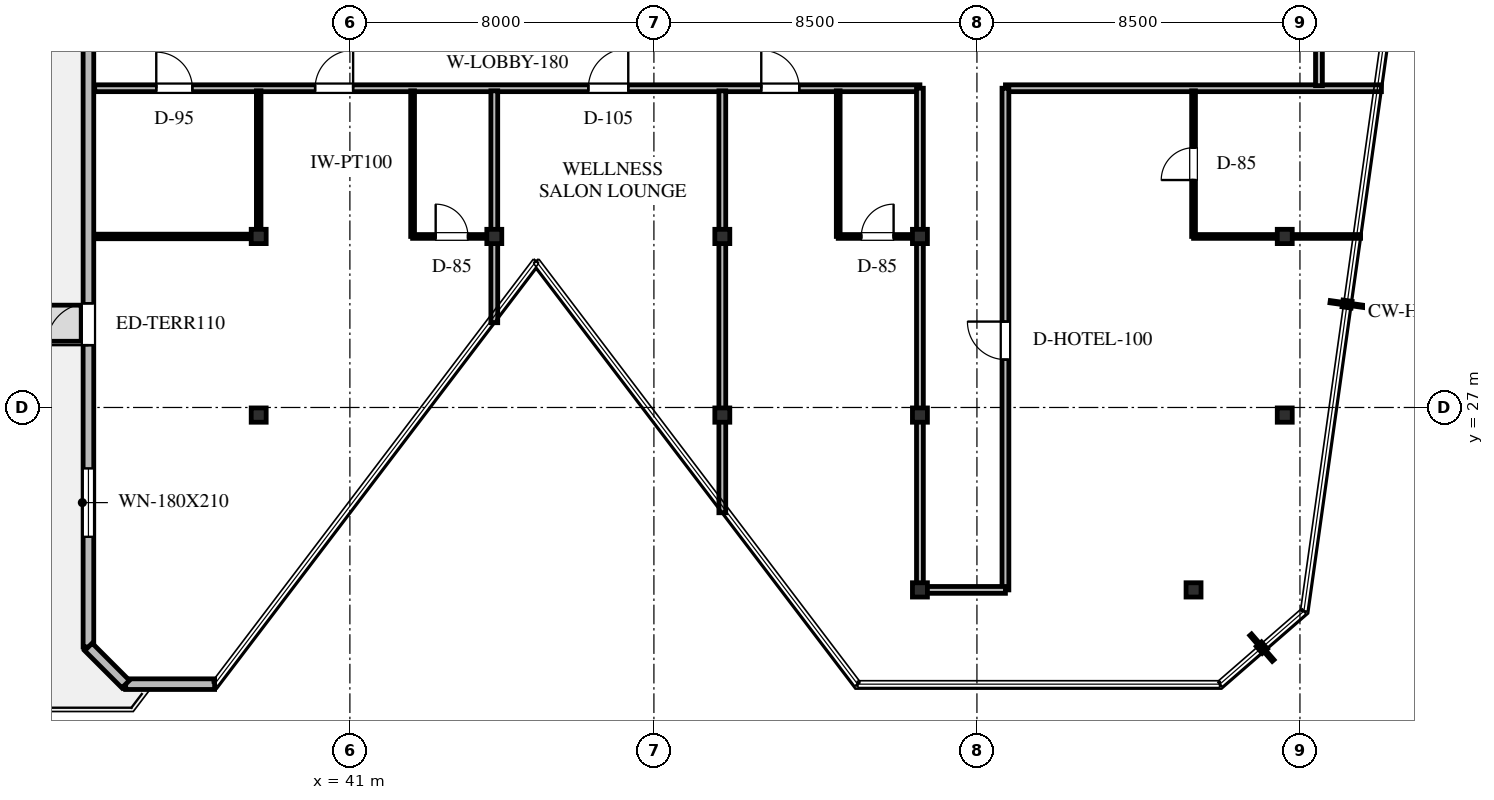
"""IFC4 building model, lengths in metres.
Left out: names, types, materials, properties, quantities, classifications, styles, units other than length and angle.
Written with IfcOpenShell. Run it as: python <this file> out.ifc"""

import sys

from ifc_helpers import new_model, si_unit, direction, frame, frame_2d, origin, origin_2d, place, context, subcontext, project, spatial, rectangle, i_section, extrude, element, fill, save


model = new_model("IFC4")
c1 = context("Model", 3, precision=1e-05, world=origin(), true_north=direction((0.0, 1.0)))
c2 = subcontext(c1, "Body", "Model", "MODEL_VIEW")
j1 = project(units=[si_unit("LENGTHUNIT", "METRE"), si_unit("PLANEANGLEUNIT", "RADIAN")], contexts=[c1])
p1 = place(None, origin())
s1 = spatial("IfcSite", under=j1, at=p1, CompositionType="ELEMENT")
p2 = place(p1, origin())
s2 = spatial("IfcBuilding", under=s1, at=p2, CompositionType="ELEMENT")
p3 = place(p2, frame((0.0, 0.0, 296.7)))
s3 = spatial("IfcBuildingStorey", under=s2, at=p3, CompositionType="ELEMENT", Elevation=296.7)
for number, where, z_axis, x_axis in (
    (1, (44.8, 31.5, 0.0), (0.0, 0.0, 1.0), (1.0, 0.0, 0.0)),
    (2, (50.8, 31.5, 0.0), (0.0, 0.0, 1.0), (1.0, 0.0, 0.0)),
    (3, (56.0, 31.5, 0.0), (0.0, 0.0, 1.0), (1.0, 0.0, 0.0)),
    (4, (65.6, 31.5, 0.0), (0.0, 0.0, 1.0), (1.0, 0.0, 0.0)),
    (5, (38.6, 31.5, 0.0), (0.0, 0.0, 1.0), (1.0, 0.0, 0.0)),
    (6, (38.6, 26.8, 0.0), (0.0, 0.0, 1.0), (1.0, 0.0, 0.0)),
    (7, (50.8, 26.8, 0.0), (0.0, 0.0, 1.0), (1.0, 0.0, 0.0)),
    (8, (56.0, 26.8, 0.0), (0.0, 0.0, 1.0), (1.0, 0.0, 0.0)),
    (9, (65.6, 26.8, 0.0), (0.0, 0.0, 1.0), (1.0, 0.0, 0.0)),
    (10, (56.0, 22.2, 0.0), (0.0, 0.0, 1.0), (1.0, 0.0, 0.0)),
    (11, (63.2, 22.2, 0.0), (0.0, 0.0, 1.0), (1.0, 0.0, 0.0)),
):
    element("IfcColumn", number, at=place(p3, frame(where, z_axis=z_axis, x_axis=x_axis)), inside=s3, PredefinedType="COLUMN", context=c2, shape_type="SweptSolid", body=[
        extrude(i_section(OverallWidth=0.394, OverallDepth=0.376, WebThickness=0.017, FlangeThickness=0.028, FilletRadius=0.03, at=origin_2d()), origin(), (0.0, 0.0, 1.0), 3.6),
    ])
p4 = place(p3, frame((34.12, 20.7, 0.0), z_axis=(0.0, 0.0, 1.0), x_axis=(0.0, 1.0, 0.0)))
e12 = element("IfcWall", 12, at=p4, inside=s3, PredefinedType="STANDARD", context=c2, shape_type="SweptSolid", body=[
    extrude(rectangle(XDim=17.1, YDim=0.28, at=frame_2d((8.55, 0.0))), origin(), (0.0, 0.0, 1.0), 3.365),
])
p5 = place(p4, frame((7.94, 0.0, 0.0)))
e13 = element("IfcOpeningElement", 13, at=p5, cuts=e12, PredefinedType="OPENING", context=c2, shape_type="SweptSolid", body=[
    extrude(rectangle(XDim=1.1, YDim=2.2, at=frame_2d((0.55, 1.1))), frame((0.0, 0.15, 0.0), z_axis=(0.0, -1.0, 0.0), x_axis=(1.0, 0.0, 0.0)), (0.0, 0.0, 1.0), 0.3),
])
p6 = place(p4, frame((2.897, 0.0, 0.65)))
e14 = element("IfcOpeningElement", 14, at=p6, cuts=e12, PredefinedType="OPENING", context=c2, shape_type="SweptSolid", body=[
    extrude(rectangle(XDim=1.8, YDim=2.1, at=frame_2d((0.9, 1.05))), frame((0.0, 0.15, 0.0), z_axis=(0.0, -1.0, 0.0), x_axis=(1.0, 0.0, 0.0)), (0.0, 0.0, 1.0), 0.3),
])
p7 = place(p3, frame((37.44, 19.72, 0.0), z_axis=(0.0, 0.0, 1.0), x_axis=(-1.0, 0.0, 0.0)))
e15 = element("IfcWall", 15, at=p7, inside=s3, PredefinedType="STANDARD", context=c2, shape_type="SweptSolid", body=[
    extrude(rectangle(XDim=2.341, YDim=0.28, at=frame_2d((1.17, 0.0))), origin(), (0.0, 0.0, 1.0), 3.365),
])
p8 = place(p3, frame((35.1, 19.72, 0.0), z_axis=(0.0, 0.0, 1.0), x_axis=(-0.707018662703, 0.70719488869, 0.0)))
e16 = element("IfcWall", 16, at=p8, inside=s3, PredefinedType="STANDARD", context=c2, shape_type="SweptSolid", body=[
    extrude(rectangle(XDim=1.385, YDim=0.28, at=frame_2d((0.693, 0.0))), origin(), (0.0, 0.0, 1.0), 3.365),
])
p9 = place(p3, frame((34.285, 35.4, 0.0), z_axis=(0.0, 0.0, 1.0), x_axis=(1.0, 0.0, 0.0)))
e17 = element("IfcWall", 17, at=p9, inside=s3, PredefinedType="STANDARD", context=c2, shape_type="SweptSolid", body=[
    extrude(rectangle(XDim=21.715, YDim=0.18, at=frame_2d((10.857, 0.0))), origin(), (0.0, 0.0, 1.0), 2.754),
])
p10 = place(p9, frame((1.62, 0.0, 0.0)))
e18 = element("IfcOpeningElement", 18, at=p10, cuts=e17, PredefinedType="OPENING", context=c2, shape_type="SweptSolid", body=[
    extrude(rectangle(XDim=0.95, YDim=2.15, at=frame_2d((0.475, 1.075))), frame((0.0, 0.1, 0.0), z_axis=(0.0, -1.0, 0.0), x_axis=(1.0, 0.0, 0.0)), (0.0, 0.0, 1.0), 0.2),
])
p11 = place(p9, frame((5.8, 0.0, 0.0)))
e19 = element("IfcOpeningElement", 19, at=p11, cuts=e17, PredefinedType="OPENING", context=c2, shape_type="SweptSolid", body=[
    extrude(rectangle(XDim=1.0, YDim=2.15, at=frame_2d((0.5, 1.075))), frame((0.0, 0.1, 0.0), z_axis=(0.0, -1.0, 0.0), x_axis=(1.0, 0.0, 0.0)), (0.0, 0.0, 1.0), 0.2),
])
p12 = place(p9, frame((12.99, 0.0, 0.0)))
e20 = element("IfcOpeningElement", 20, at=p12, cuts=e17, PredefinedType="OPENING", context=c2, shape_type="SweptSolid", body=[
    extrude(rectangle(XDim=1.05, YDim=2.2, at=frame_2d((0.525, 1.1))), frame((0.0, 0.1, 0.0), z_axis=(0.0, -1.0, 0.0), x_axis=(1.0, 0.0, 0.0)), (0.0, 0.0, 1.0), 0.2),
])
p13 = place(p9, frame((17.54, 0.0, 0.0)))
e21 = element("IfcOpeningElement", 21, at=p13, cuts=e17, PredefinedType="OPENING", context=c2, shape_type="SweptSolid", body=[
    extrude(rectangle(XDim=1.0, YDim=2.15, at=frame_2d((0.5, 1.075))), frame((0.0, 0.1, 0.0), z_axis=(0.0, -1.0, 0.0), x_axis=(1.0, 0.0, 0.0)), (0.0, 0.0, 1.0), 0.2),
])
p14 = place(p3, frame((58.25, 35.4, 0.0), z_axis=(0.0, 0.0, 1.0), x_axis=(1.0, 0.0, 0.0)))
e22 = element("IfcWall", 22, at=p14, inside=s3, PredefinedType="STANDARD", context=c2, shape_type="SweptSolid", body=[
    extrude(rectangle(XDim=9.894, YDim=0.18, at=frame_2d((4.947, 0.0))), origin(), (0.0, 0.0, 1.0), 3.365),
])
p15 = place(p3, frame((66.5, 35.468, 0.0), z_axis=(0.0, 0.0, 1.0), x_axis=(0.0, 1.0, 0.0)))
e23 = element("IfcWall", 23, at=p15, inside=s3, PredefinedType="STANDARD", context=c2, shape_type="SweptSolid", body=[
    extrude(rectangle(XDim=2.582, YDim=0.18, at=frame_2d((1.291, 0.0))), origin(), (0.0, 0.0, 1.0), 2.754),
])
p16 = place(p3, frame((56.0, 22.2, 0.0), z_axis=(0.0, 0.0, 1.0), x_axis=(0.0, 1.0, 0.0)))
e24 = element("IfcWall", 24, at=p16, inside=s3, PredefinedType="STANDARD", context=c2, shape_type="SweptSolid", body=[
    extrude(rectangle(XDim=13.2, YDim=0.18, at=frame_2d((6.6, 0.0))), origin(), (0.0, 0.0, 1.0), 2.754),
])
p17 = place(p3, frame((58.25, 22.2, 0.0), z_axis=(0.0, 0.0, 1.0), x_axis=(0.0, 1.0, 0.0)))
e25 = element("IfcWall", 25, at=p17, inside=s3, PredefinedType="STANDARD", context=c2, shape_type="SweptSolid", body=[
    extrude(rectangle(XDim=13.2, YDim=0.18, at=frame_2d((6.6, 0.0))), origin(), (0.0, 0.0, 1.0), 2.754),
])
p18 = place(p17, frame((6.06, 0.0, 0.0)))
e26 = element("IfcOpeningElement", 26, at=p18, cuts=e25, PredefinedType="OPENING", context=c2, shape_type="SweptSolid", body=[
    extrude(rectangle(XDim=1.0, YDim=2.15, at=frame_2d((0.5, 1.075))), frame((0.0, 0.1, 0.0), z_axis=(0.0, -1.0, 0.0), x_axis=(1.0, 0.0, 0.0)), (0.0, 0.0, 1.0), 0.2),
])
p19 = place(p3, frame((56.0, 22.2, 0.0), z_axis=(0.0, 0.0, 1.0), x_axis=(1.0, 0.0, 0.0)))
e27 = element("IfcWall", 27, at=p19, inside=s3, PredefinedType="STANDARD", context=c2, shape_type="SweptSolid", body=[
    extrude(rectangle(XDim=2.25, YDim=0.18, at=frame_2d((1.125, 0.0))), origin(), (0.0, 0.0, 1.0), 2.754),
])
p20 = place(p3, frame((38.6, 31.5, 0.0), z_axis=(0.0, 0.0, 1.0), x_axis=(0.0, 1.0, 0.0)))
e28 = element("IfcWall", 28, at=p20, inside=s3, PredefinedType="PARTITIONING", context=c2, shape_type="SweptSolid", body=[
    extrude(rectangle(XDim=3.832, YDim=0.12, at=frame_2d((1.916, 0.0))), origin(), (0.0, 0.0, 1.0), 2.754),
])
p21 = place(p3, frame((34.285, 31.5, 0.0), z_axis=(0.0, 0.0, 1.0), x_axis=(1.0, 0.0, 0.0)))
e29 = element("IfcWall", 29, at=p21, inside=s3, PredefinedType="PARTITIONING", context=c2, shape_type="SweptSolid", body=[
    extrude(rectangle(XDim=4.315, YDim=0.12, at=frame_2d((2.158, 0.0))), origin(), (0.0, 0.0, 1.0), 2.754),
])
p22 = place(p3, frame((63.2, 31.5, 0.0), z_axis=(0.0, 0.0, 1.0), x_axis=(1.0, 0.0, 0.0)))
e30 = element("IfcWall", 30, at=p22, inside=s3, PredefinedType="PARTITIONING", context=c2, shape_type="SweptSolid", body=[
    extrude(rectangle(XDim=4.396, YDim=0.1, at=frame_2d((2.198, 0.0))), origin(), (0.0, 0.0, 1.0), 2.754),
])
p23 = place(p3, frame((63.2, 31.5, 0.0), z_axis=(0.0, 0.0, 1.0), x_axis=(0.0, 1.0, 0.0)))
e31 = element("IfcWall", 31, at=p23, inside=s3, PredefinedType="PARTITIONING", context=c2, shape_type="SweptSolid", body=[
    extrude(rectangle(XDim=3.832, YDim=0.1, at=frame_2d((1.916, 0.0))), origin(), (0.0, 0.0, 1.0), 2.754),
])
p24 = place(p23, frame((1.485, 0.0, 0.0)))
e32 = element("IfcOpeningElement", 32, at=p24, cuts=e31, PredefinedType="OPENING", context=c2, shape_type="SweptSolid", body=[
    extrude(rectangle(XDim=0.85, YDim=2.1, at=frame_2d((0.425, 1.05))), frame((0.0, 0.06, 0.0), z_axis=(0.0, -1.0, 0.0), x_axis=(1.0, 0.0, 0.0)), (0.0, 0.0, 1.0), 0.12),
])
p25 = place(p3, frame((42.65, 31.5, 0.0), z_axis=(0.0, 0.0, 1.0), x_axis=(0.0, 1.0, 0.0)))
e33 = element("IfcWall", 33, at=p25, inside=s3, PredefinedType="PARTITIONING", context=c2, shape_type="SweptSolid", body=[
    extrude(rectangle(XDim=3.832, YDim=0.1, at=frame_2d((1.916, 0.0))), origin(), (0.0, 0.0, 1.0), 2.754),
])
p26 = place(p3, frame((42.65, 31.5, 0.0), z_axis=(0.0, 0.0, 1.0), x_axis=(1.0, 0.0, 0.0)))
e34 = element("IfcWall", 34, at=p26, inside=s3, PredefinedType="PARTITIONING", context=c2, shape_type="SweptSolid", body=[
    extrude(rectangle(XDim=2.082, YDim=0.1, at=frame_2d((1.041, 0.0))), origin(), (0.0, 0.0, 1.0), 2.754),
])
p27 = place(p26, frame((0.607, 0.0, 0.0)))
e35 = element("IfcOpeningElement", 35, at=p27, cuts=e34, PredefinedType="OPENING", context=c2, shape_type="SweptSolid", body=[
    extrude(rectangle(XDim=0.85, YDim=2.1, at=frame_2d((0.425, 1.05))), frame((0.0, 0.06, 0.0), z_axis=(0.0, -1.0, 0.0), x_axis=(1.0, 0.0, 0.0)), (0.0, 0.0, 1.0), 0.12),
])
p28 = place(p3, frame((44.8, 29.23, 0.0), z_axis=(0.0, 0.0, 1.0), x_axis=(0.0, 1.0, 0.0)))
e36 = element("IfcWall", 36, at=p28, inside=s3, PredefinedType="STANDARD", context=c2, shape_type="SweptSolid", body=[
    extrude(rectangle(XDim=6.102, YDim=0.18, at=frame_2d((3.051, 0.0))), origin(), (0.0, 0.0, 1.0), 2.754),
])
p29 = place(p3, frame((50.8, 24.23, 0.0), z_axis=(0.0, 0.0, 1.0), x_axis=(0.0, 1.0, 0.0)))
e37 = element("IfcWall", 37, at=p29, inside=s3, PredefinedType="STANDARD", context=c2, shape_type="SweptSolid", body=[
    extrude(rectangle(XDim=11.102, YDim=0.18, at=frame_2d((5.551, 0.0))), origin(), (0.0, 0.0, 1.0), 2.754),
])
p30 = place(p3, frame((53.85, 31.5, 0.0), z_axis=(0.0, 0.0, 1.0), x_axis=(0.0, 1.0, 0.0)))
e38 = element("IfcWall", 38, at=p30, inside=s3, PredefinedType="PARTITIONING", context=c2, shape_type="SweptSolid", body=[
    extrude(rectangle(XDim=3.832, YDim=0.1, at=frame_2d((1.916, 0.0))), origin(), (0.0, 0.0, 1.0), 2.754),
])
p31 = place(p3, frame((53.85, 31.5, 0.0), z_axis=(0.0, 0.0, 1.0), x_axis=(1.0, 0.0, 0.0)))
e39 = element("IfcWall", 39, at=p31, inside=s3, PredefinedType="PARTITIONING", context=c2, shape_type="SweptSolid", body=[
    extrude(rectangle(XDim=2.082, YDim=0.1, at=frame_2d((1.041, 0.0))), origin(), (0.0, 0.0, 1.0), 2.754),
])
p32 = place(p31, frame((0.607, 0.0, 0.0)))
e40 = element("IfcOpeningElement", 40, at=p32, cuts=e39, PredefinedType="OPENING", context=c2, shape_type="SweptSolid", body=[
    extrude(rectangle(XDim=0.85, YDim=2.1, at=frame_2d((0.425, 1.05))), frame((0.0, 0.06, 0.0), z_axis=(0.0, -1.0, 0.0), x_axis=(1.0, 0.0, 0.0)), (0.0, 0.0, 1.0), 0.12),
])
p33 = place(p5, origin())
e41 = element("IfcDoor", 41, at=p33, inside=s3, OperationType="SINGLE_SWING_LEFT", PredefinedType="DOOR", context=c2, shape_type="SweptSolid", body=[
    extrude(rectangle(XDim=1.1, YDim=2.2, at=frame_2d((0.55, 1.1))), frame((0.0, 0.025, 0.0), z_axis=(0.0, -1.0, 0.0), x_axis=(1.0, 0.0, 0.0)), (0.0, 0.0, 1.0), 0.05),
])
fill(e13, e41)
p34 = place(p6, origin())
e42 = element("IfcWindow", 42, at=p34, inside=s3, PartitioningType="SINGLE_PANEL", PredefinedType="WINDOW", context=c2, shape_type="SweptSolid", body=[
    extrude(rectangle(XDim=1.8, YDim=2.1, at=frame_2d((0.9, 1.05))), frame((0.0, 0.03, 0.0), z_axis=(0.0, -1.0, 0.0), x_axis=(1.0, 0.0, 0.0)), (0.0, 0.0, 1.0), 0.06),
])
fill(e14, e42)
p35 = place(p10, origin())
e43 = element("IfcDoor", 43, at=p35, inside=s3, OperationType="SINGLE_SWING_LEFT", PredefinedType="DOOR", context=c2, shape_type="SweptSolid", body=[
    extrude(rectangle(XDim=0.95, YDim=2.15, at=frame_2d((0.475, 1.075))), frame((0.0, 0.025, 0.0), z_axis=(0.0, -1.0, 0.0), x_axis=(1.0, 0.0, 0.0)), (0.0, 0.0, 1.0), 0.05),
])
fill(e18, e43)
p36 = place(p18, origin())
e44 = element("IfcDoor", 44, at=p36, inside=s3, OperationType="SINGLE_SWING_RIGHT", PredefinedType="DOOR", context=c2, shape_type="SweptSolid", body=[
    extrude(rectangle(XDim=1.0, YDim=2.15, at=frame_2d((0.5, 1.075))), frame((0.0, 0.025, 0.0), z_axis=(0.0, -1.0, 0.0), x_axis=(1.0, 0.0, 0.0)), (0.0, 0.0, 1.0), 0.05),
])
fill(e26, e44)
p37 = place(p24, origin())
e45 = element("IfcDoor", 45, at=p37, inside=s3, OperationType="SINGLE_SWING_LEFT", PredefinedType="DOOR", context=c2, shape_type="SweptSolid", body=[
    extrude(rectangle(XDim=0.85, YDim=2.1, at=frame_2d((0.425, 1.05))), frame((0.0, 0.025, 0.0), z_axis=(0.0, -1.0, 0.0), x_axis=(1.0, 0.0, 0.0)), (0.0, 0.0, 1.0), 0.05),
])
fill(e32, e45)
p38 = place(p11, origin())
e46 = element("IfcDoor", 46, at=p38, inside=s3, OperationType="SINGLE_SWING_RIGHT", PredefinedType="DOOR", context=c2, shape_type="SweptSolid", body=[
    extrude(rectangle(XDim=1.0, YDim=2.15, at=frame_2d((0.5, 1.075))), frame((0.0, 0.025, 0.0), z_axis=(0.0, -1.0, 0.0), x_axis=(1.0, 0.0, 0.0)), (0.0, 0.0, 1.0), 0.05),
])
fill(e19, e46)
p39 = place(p27, origin())
e47 = element("IfcDoor", 47, at=p39, inside=s3, OperationType="SINGLE_SWING_LEFT", PredefinedType="DOOR", context=c2, shape_type="SweptSolid", body=[
    extrude(rectangle(XDim=0.85, YDim=2.1, at=frame_2d((0.425, 1.05))), frame((0.0, 0.025, 0.0), z_axis=(0.0, -1.0, 0.0), x_axis=(1.0, 0.0, 0.0)), (0.0, 0.0, 1.0), 0.05),
])
fill(e35, e47)
p40 = place(p12, origin())
e48 = element("IfcDoor", 48, at=p40, inside=s3, OperationType="SINGLE_SWING_RIGHT", PredefinedType="DOOR", context=c2, shape_type="SweptSolid", body=[
    extrude(rectangle(XDim=1.05, YDim=2.2, at=frame_2d((0.525, 1.1))), frame((0.0, 0.025, 0.0), z_axis=(0.0, -1.0, 0.0), x_axis=(1.0, 0.0, 0.0)), (0.0, 0.0, 1.0), 0.05),
])
fill(e20, e48)
p41 = place(p13, origin())
e49 = element("IfcDoor", 49, at=p41, inside=s3, OperationType="SINGLE_SWING_LEFT", PredefinedType="DOOR", context=c2, shape_type="SweptSolid", body=[
    extrude(rectangle(XDim=1.0, YDim=2.15, at=frame_2d((0.5, 1.075))), frame((0.0, 0.025, 0.0), z_axis=(0.0, -1.0, 0.0), x_axis=(1.0, 0.0, 0.0)), (0.0, 0.0, 1.0), 0.05),
])
fill(e21, e49)
p42 = place(p32, origin())
e50 = element("IfcDoor", 50, at=p42, inside=s3, OperationType="SINGLE_SWING_RIGHT", PredefinedType="DOOR", context=c2, shape_type="SweptSolid", body=[
    extrude(rectangle(XDim=0.85, YDim=2.1, at=frame_2d((0.425, 1.05))), frame((0.0, 0.025, 0.0), z_axis=(0.0, -1.0, 0.0), x_axis=(1.0, 0.0, 0.0)), (0.0, 0.0, 1.0), 0.05),
])
fill(e40, e50)
save(model, sys.argv[1])
